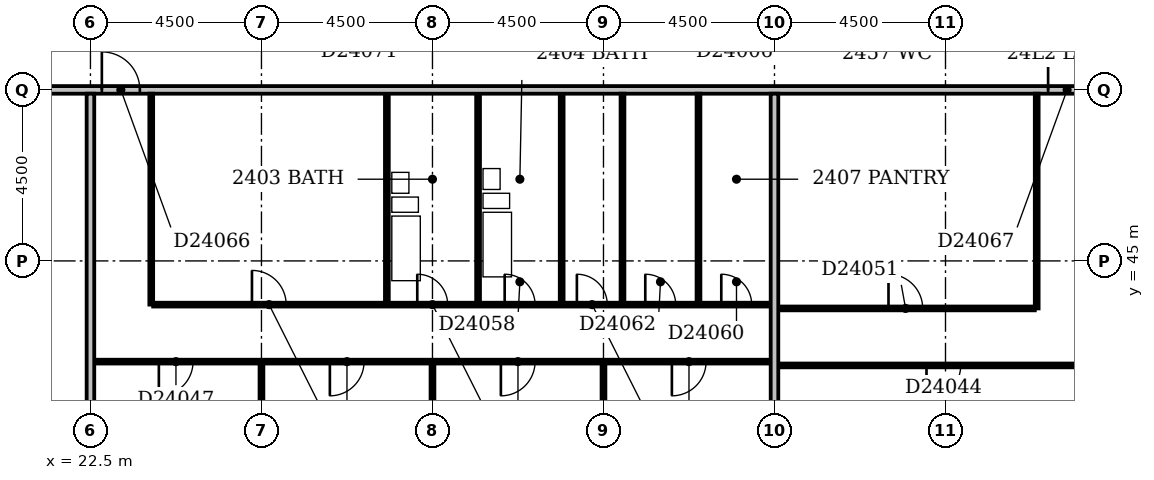
"""IFC4 building model, lengths in metres.
Left out: names, types, materials, properties, quantities, classifications, styles, units other than length and angle.
Written with IfcOpenShell. Run it as: python <this file> out.ifc"""

import sys

from ifc_helpers import new_model, si_unit, direction, frame, frame_2d, origin, place, context, subcontext, project, spatial, rectangle, extrude, element, fill, save


model = new_model("IFC4")
c1 = context("Model", 3, precision=1e-05, world=origin(), true_north=direction((0.0, 1.0)))
c2 = subcontext(c1, "Body", "Model", "MODEL_VIEW")
j1 = project(units=[si_unit("LENGTHUNIT", "METRE"), si_unit("PLANEANGLEUNIT", "RADIAN")], contexts=[c1])
p1 = place(None, origin())
s1 = spatial("IfcSite", under=j1, at=p1, CompositionType="ELEMENT")
p2 = place(p1, origin())
s2 = spatial("IfcBuilding", under=s1, at=p2, CompositionType="ELEMENT")
p3 = place(p2, frame((0.0, 0.0, 97.4)))
s3 = spatial("IfcBuildingStorey", under=s2, at=p3, CompositionType="ELEMENT", Elevation=97.4)
p4 = place(p3, frame((22.5, 36.6, 0.0), z_axis=(0.0, 0.0, 1.0), x_axis=(0.0, 1.0, 0.0)))
e1 = element("IfcWall", 1, at=p4, inside=s3, PredefinedType="PARTITIONING", context=c2, shape_type="SweptSolid", body=[
    extrude(rectangle(XDim=12.8, YDim=0.2, at=frame_2d((6.4, 0.0))), origin(), (0.0, 0.0, 1.0), 3.3),
])
p5 = place(p3, frame((27.0, 36.6, 0.0), z_axis=(0.0, 0.0, 1.0), x_axis=(0.0, 1.0, 0.0)))
e2 = element("IfcWall", 2, at=p5, inside=s3, PredefinedType="PARTITIONING", context=c2, shape_type="SweptSolid", body=[
    extrude(rectangle(XDim=5.7, YDim=0.1, at=frame_2d((2.85, 0.0))), origin(), (0.0, 0.0, 1.0), 2.6),
])
p6 = place(p3, frame((31.5, 36.6, 0.0), z_axis=(0.0, 0.0, 1.0), x_axis=(0.0, 1.0, 0.0)))
e3 = element("IfcWall", 3, at=p6, inside=s3, PredefinedType="PARTITIONING", context=c2, shape_type="SweptSolid", body=[
    extrude(rectangle(XDim=5.7, YDim=0.1, at=frame_2d((2.85, 0.0))), origin(), (0.0, 0.0, 1.0), 3.3),
])
p7 = place(p3, frame((36.0, 36.6, 0.0), z_axis=(0.0, 0.0, 1.0), x_axis=(0.0, 1.0, 0.0)))
e4 = element("IfcWall", 4, at=p7, inside=s3, PredefinedType="PARTITIONING", context=c2, shape_type="SweptSolid", body=[
    extrude(rectangle(XDim=5.7, YDim=0.1, at=frame_2d((2.85, 0.0))), origin(), (0.0, 0.0, 1.0), 2.4),
])
p8 = place(p3, frame((40.5, 36.6, 0.0), z_axis=(0.0, 0.0, 1.0), x_axis=(0.0, 1.0, 0.0)))
e5 = element("IfcWall", 5, at=p8, inside=s3, PredefinedType="PARTITIONING", context=c2, shape_type="SweptSolid", body=[
    extrude(rectangle(XDim=12.8, YDim=0.2, at=frame_2d((6.4, 0.0))), origin(), (0.0, 0.0, 1.0), 3.3),
])
p9 = place(p3, frame((40.6, 42.25, 0.0), z_axis=(0.0, 0.0, 1.0), x_axis=(1.0, 0.0, 0.0)))
e6 = element("IfcWall", 6, at=p9, inside=s3, PredefinedType="PARTITIONING", context=c2, shape_type="SweptSolid", body=[
    extrude(rectangle(XDim=17.8, YDim=0.1, at=frame_2d((8.9, 0.0))), origin(), (0.0, 0.0, 1.0), 3.3),
])
p10 = place(p9, frame((3.9, 0.0, 0.0)))
e7 = element("IfcOpeningElement", 7, at=p10, cuts=e6, PredefinedType="OPENING", context=c2, shape_type="SweptSolid", body=[
    extrude(rectangle(XDim=0.9, YDim=2.1, at=frame_2d((0.45, 1.05))), frame((0.0, 0.062, 0.0), z_axis=(0.0, -1.0, 0.0), x_axis=(1.0, 0.0, 0.0)), (0.0, 0.0, 1.0), 0.124),
])
p11 = place(p9, frame((10.7, 0.0, 0.0)))
e8 = element("IfcOpeningElement", 8, at=p11, cuts=e6, PredefinedType="OPENING", context=c2, shape_type="SweptSolid", body=[
    extrude(rectangle(XDim=0.9, YDim=2.1, at=frame_2d((0.45, 1.05))), frame((0.0, 0.062, 0.0), z_axis=(0.0, -1.0, 0.0), x_axis=(1.0, 0.0, 0.0)), (0.0, 0.0, 1.0), 0.124),
])
p12 = place(p9, frame((14.05, 0.0, 0.0)))
e9 = element("IfcOpeningElement", 9, at=p12, cuts=e6, PredefinedType="OPENING", context=c2, shape_type="SweptSolid", body=[
    extrude(rectangle(XDim=0.9, YDim=2.1, at=frame_2d((0.45, 1.05))), frame((0.0, 0.062, 0.0), z_axis=(0.0, -1.0, 0.0), x_axis=(1.0, 0.0, 0.0)), (0.0, 0.0, 1.0), 0.124),
])
p13 = place(p3, frame((22.6, 42.35, 0.0), z_axis=(0.0, 0.0, 1.0), x_axis=(1.0, 0.0, 0.0)))
e10 = element("IfcWall", 10, at=p13, inside=s3, PredefinedType="PARTITIONING", context=c2, shape_type="SweptSolid", body=[
    extrude(rectangle(XDim=17.8, YDim=0.1, at=frame_2d((8.9, 0.0))), origin(), (0.0, 0.0, 1.0), 3.3),
])
p14 = place(p13, frame((1.7, 0.0, 0.0)))
e11 = element("IfcOpeningElement", 11, at=p14, cuts=e10, PredefinedType="OPENING", context=c2, shape_type="SweptSolid", body=[
    extrude(rectangle(XDim=0.9, YDim=2.1, at=frame_2d((0.45, 1.05))), frame((0.0, 0.062, 0.0), z_axis=(0.0, -1.0, 0.0), x_axis=(1.0, 0.0, 0.0)), (0.0, 0.0, 1.0), 0.124),
])
p15 = place(p13, frame((6.2, 0.0, 0.0)))
e12 = element("IfcOpeningElement", 12, at=p15, cuts=e10, PredefinedType="OPENING", context=c2, shape_type="SweptSolid", body=[
    extrude(rectangle(XDim=0.9, YDim=2.1, at=frame_2d((0.45, 1.05))), frame((0.0, 0.062, 0.0), z_axis=(0.0, -1.0, 0.0), x_axis=(1.0, 0.0, 0.0)), (0.0, 0.0, 1.0), 0.124),
])
p16 = place(p13, frame((10.7, 0.0, 0.0)))
e13 = element("IfcOpeningElement", 13, at=p16, cuts=e10, PredefinedType="OPENING", context=c2, shape_type="SweptSolid", body=[
    extrude(rectangle(XDim=0.9, YDim=2.1, at=frame_2d((0.45, 1.05))), frame((0.0, 0.062, 0.0), z_axis=(0.0, -1.0, 0.0), x_axis=(1.0, 0.0, 0.0)), (0.0, 0.0, 1.0), 0.124),
])
p17 = place(p13, frame((15.2, 0.0, 0.0)))
e14 = element("IfcOpeningElement", 14, at=p17, cuts=e10, PredefinedType="OPENING", context=c2, shape_type="SweptSolid", body=[
    extrude(rectangle(XDim=0.9, YDim=2.1, at=frame_2d((0.45, 1.05))), frame((0.0, 0.062, 0.0), z_axis=(0.0, -1.0, 0.0), x_axis=(1.0, 0.0, 0.0)), (0.0, 0.0, 1.0), 0.124),
])
p18 = place(p3, frame((40.6, 43.75, 0.0), z_axis=(0.0, 0.0, 1.0), x_axis=(1.0, 0.0, 0.0)))
e15 = element("IfcWall", 15, at=p18, inside=s3, PredefinedType="PARTITIONING", context=c2, shape_type="SweptSolid", body=[
    extrude(rectangle(XDim=6.75, YDim=0.1, at=frame_2d((3.375, 0.0))), origin(), (0.0, 0.0, 1.0), 3.3),
])
p19 = place(p18, frame((2.9, 0.0, 0.0)))
e16 = element("IfcOpeningElement", 16, at=p19, cuts=e15, PredefinedType="OPENING", context=c2, shape_type="SweptSolid", body=[
    extrude(rectangle(XDim=0.9, YDim=2.1, at=frame_2d((0.45, 1.05))), frame((0.0, 0.062, 0.0), z_axis=(0.0, -1.0, 0.0), x_axis=(1.0, 0.0, 0.0)), (0.0, 0.0, 1.0), 0.124),
])
p20 = place(p3, frame((47.4, 43.75, 0.0), z_axis=(0.0, 0.0, 1.0), x_axis=(0.0, 1.0, 0.0)))
e17 = element("IfcWall", 17, at=p20, inside=s3, PredefinedType="PARTITIONING", context=c2, shape_type="SweptSolid", body=[
    extrude(rectangle(XDim=5.65, YDim=0.1, at=frame_2d((2.825, 0.0))), origin(), (0.0, 0.0, 1.0), 3.3),
])
p21 = place(p3, frame((24.1, 43.85, 0.0), z_axis=(0.0, 0.0, 1.0), x_axis=(0.0, 1.0, 0.0)))
e18 = element("IfcWall", 18, at=p21, inside=s3, PredefinedType="PARTITIONING", context=c2, shape_type="SweptSolid", body=[
    extrude(rectangle(XDim=5.55, YDim=0.1, at=frame_2d((2.775, 0.0))), origin(), (0.0, 0.0, 1.0), 3.3),
])
p22 = place(p3, frame((24.15, 43.85, 0.0), z_axis=(0.0, 0.0, 1.0), x_axis=(1.0, 0.0, 0.0)))
e19 = element("IfcWall", 19, at=p22, inside=s3, PredefinedType="PARTITIONING", context=c2, shape_type="SweptSolid", body=[
    extrude(rectangle(XDim=16.25, YDim=0.1, at=frame_2d((8.125, 0.0))), origin(), (0.0, 0.0, 1.0), 3.3),
])
p23 = place(p22, frame((6.95, 0.0, 0.0)))
e20 = element("IfcOpeningElement", 20, at=p23, cuts=e19, PredefinedType="OPENING", context=c2, shape_type="SweptSolid", body=[
    extrude(rectangle(XDim=0.8, YDim=2.1, at=frame_2d((0.4, 1.05))), frame((0.0, 0.062, 0.0), z_axis=(0.0, -1.0, 0.0), x_axis=(1.0, 0.0, 0.0)), (0.0, 0.0, 1.0), 0.124),
])
p24 = place(p22, frame((9.25, 0.0, 0.0)))
e21 = element("IfcOpeningElement", 21, at=p24, cuts=e19, PredefinedType="OPENING", context=c2, shape_type="SweptSolid", body=[
    extrude(rectangle(XDim=0.8, YDim=2.1, at=frame_2d((0.4, 1.05))), frame((0.0, 0.062, 0.0), z_axis=(0.0, -1.0, 0.0), x_axis=(1.0, 0.0, 0.0)), (0.0, 0.0, 1.0), 0.124),
])
p25 = place(p22, frame((2.6, 0.0, 0.0)))
e22 = element("IfcOpeningElement", 22, at=p25, cuts=e19, PredefinedType="OPENING", context=c2, shape_type="SweptSolid", body=[
    extrude(rectangle(XDim=0.9, YDim=2.1, at=frame_2d((0.45, 1.05))), frame((0.0, 0.062, 0.0), z_axis=(0.0, -1.0, 0.0), x_axis=(1.0, 0.0, 0.0)), (0.0, 0.0, 1.0), 0.124),
])
p26 = place(p22, frame((14.95, 0.0, 0.0)))
e23 = element("IfcOpeningElement", 23, at=p26, cuts=e19, PredefinedType="OPENING", context=c2, shape_type="SweptSolid", body=[
    extrude(rectangle(XDim=0.8, YDim=2.1, at=frame_2d((0.4, 1.05))), frame((0.0, 0.062, 0.0), z_axis=(0.0, -1.0, 0.0), x_axis=(1.0, 0.0, 0.0)), (0.0, 0.0, 1.0), 0.124),
])
p27 = place(p22, frame((11.15, 0.0, 0.0)))
e24 = element("IfcOpeningElement", 24, at=p27, cuts=e19, PredefinedType="OPENING", context=c2, shape_type="SweptSolid", body=[
    extrude(rectangle(XDim=0.8, YDim=2.1, at=frame_2d((0.4, 1.05))), frame((0.0, 0.062, 0.0), z_axis=(0.0, -1.0, 0.0), x_axis=(1.0, 0.0, 0.0)), (0.0, 0.0, 1.0), 0.124),
])
p28 = place(p22, frame((12.95, 0.0, 0.0)))
e25 = element("IfcOpeningElement", 25, at=p28, cuts=e19, PredefinedType="OPENING", context=c2, shape_type="SweptSolid", body=[
    extrude(rectangle(XDim=0.8, YDim=2.1, at=frame_2d((0.4, 1.05))), frame((0.0, 0.062, 0.0), z_axis=(0.0, -1.0, 0.0), x_axis=(1.0, 0.0, 0.0)), (0.0, 0.0, 1.0), 0.124),
])
for number, where, z_axis, x_axis in (
    (26, (30.3, 43.9, 0.0), (0.0, 0.0, 1.0), (0.0, 1.0, 0.0)),
    (27, (32.7, 43.9, 0.0), (0.0, 0.0, 1.0), (0.0, 1.0, 0.0)),
    (28, (34.9, 43.9, 0.0), (0.0, 0.0, 1.0), (0.0, 1.0, 0.0)),
):
    element("IfcWall", number, at=place(p3, frame(where, z_axis=z_axis, x_axis=x_axis)), inside=s3, PredefinedType="PLUMBINGWALL", context=c2, shape_type="SweptSolid", body=[
        extrude(rectangle(XDim=5.5, YDim=0.1, at=frame_2d((2.75, 0.0))), origin(), (0.0, 0.0, 1.0), 3.3),
    ])
p29 = place(p3, frame((36.5, 43.9, 0.0), z_axis=(0.0, 0.0, 1.0), x_axis=(0.0, 1.0, 0.0)))
e29 = element("IfcWall", 29, at=p29, inside=s3, PredefinedType="PARTITIONING", context=c2, shape_type="SweptSolid", body=[
    extrude(rectangle(XDim=5.5, YDim=0.1, at=frame_2d((2.75, 0.0))), origin(), (0.0, 0.0, 1.0), 2.4),
])
p30 = place(p3, frame((38.5, 43.9, 0.0), z_axis=(0.0, 0.0, 1.0), x_axis=(0.0, 1.0, 0.0)))
e30 = element("IfcWall", 30, at=p30, inside=s3, PredefinedType="PARTITIONING", context=c2, shape_type="SweptSolid", body=[
    extrude(rectangle(XDim=5.5, YDim=0.1, at=frame_2d((2.75, 0.0))), origin(), (0.0, 0.0, 1.0), 3.3),
])
p31 = place(p3, frame((9.1, 49.5, 0.0), z_axis=(0.0, 0.0, 1.0), x_axis=(1.0, 0.0, 0.0)))
e31 = element("IfcWall", 31, at=p31, inside=s3, PredefinedType="PARTITIONING", context=c2, shape_type="SweptSolid", body=[
    extrude(rectangle(XDim=57.8, YDim=0.2, at=frame_2d((28.9, 0.0))), origin(), (0.0, 0.0, 1.0), 3.3),
])
p32 = place(p31, frame((13.7, 0.0, 0.0)))
e32 = element("IfcOpeningElement", 32, at=p32, cuts=e31, PredefinedType="OPENING", context=c2, shape_type="SweptSolid", body=[
    extrude(rectangle(XDim=1.0, YDim=2.1, at=frame_2d((0.5, 1.05))), frame((0.0, 0.112, 0.0), z_axis=(0.0, -1.0, 0.0), x_axis=(1.0, 0.0, 0.0)), (0.0, 0.0, 1.0), 0.224),
])
p33 = place(p31, frame((38.6, 0.0, 0.0)))
e33 = element("IfcOpeningElement", 33, at=p33, cuts=e31, PredefinedType="OPENING", context=c2, shape_type="SweptSolid", body=[
    extrude(rectangle(XDim=1.0, YDim=2.1, at=frame_2d((0.5, 1.05))), frame((0.0, 0.112, 0.0), z_axis=(0.0, -1.0, 0.0), x_axis=(1.0, 0.0, 0.0)), (0.0, 0.0, 1.0), 0.224),
])
p34 = place(p31, frame((52.1, 0.0, 0.0)))
e34 = element("IfcOpeningElement", 34, at=p34, cuts=e31, PredefinedType="OPENING", context=c2, shape_type="SweptSolid", body=[
    extrude(rectangle(XDim=1.0, YDim=2.1, at=frame_2d((0.5, 1.05))), frame((0.0, 0.112, 0.0), z_axis=(0.0, -1.0, 0.0), x_axis=(1.0, 0.0, 0.0)), (0.0, 0.0, 1.0), 0.224),
])
p35 = place(p31, frame((6.15, 0.0, 0.0)))
e35 = element("IfcOpeningElement", 35, at=p35, cuts=e31, PredefinedType="OPENING", context=c2, shape_type="SweptSolid", body=[
    extrude(rectangle(XDim=0.9, YDim=2.1, at=frame_2d((0.45, 1.05))), frame((0.0, 0.112, 0.0), z_axis=(0.0, -1.0, 0.0), x_axis=(1.0, 0.0, 0.0)), (0.0, 0.0, 1.0), 0.224),
])
p36 = place(p31, frame((10.65, 0.0, 0.0)))
e36 = element("IfcOpeningElement", 36, at=p36, cuts=e31, PredefinedType="OPENING", context=c2, shape_type="SweptSolid", body=[
    extrude(rectangle(XDim=0.9, YDim=2.1, at=frame_2d((0.45, 1.05))), frame((0.0, 0.112, 0.0), z_axis=(0.0, -1.0, 0.0), x_axis=(1.0, 0.0, 0.0)), (0.0, 0.0, 1.0), 0.224),
])
p37 = place(p10, frame((0.9, 0.0, 0.0), z_axis=(0.0, 0.0, 1.0), x_axis=(-1.0, 0.0, 0.0)))
e37 = element("IfcDoor", 37, at=p37, inside=s3, OperationType="SINGLE_SWING_RIGHT", PredefinedType="DOOR", context=c2, shape_type="SweptSolid", body=[
    extrude(rectangle(XDim=0.9, YDim=2.1, at=frame_2d((0.45, 1.05))), frame((0.0, 0.025, 0.0), z_axis=(0.0, -1.0, 0.0), x_axis=(1.0, 0.0, 0.0)), (0.0, 0.0, 1.0), 0.05),
])
fill(e7, e37)
p38 = place(p14, frame((0.9, 0.0, 0.0), z_axis=(0.0, 0.0, 1.0), x_axis=(-1.0, 0.0, 0.0)))
e38 = element("IfcDoor", 38, at=p38, inside=s3, OperationType="SINGLE_SWING_RIGHT", PredefinedType="DOOR", context=c2, shape_type="SweptSolid", body=[
    extrude(rectangle(XDim=0.9, YDim=2.1, at=frame_2d((0.45, 1.05))), frame((0.0, 0.025, 0.0), z_axis=(0.0, -1.0, 0.0), x_axis=(1.0, 0.0, 0.0)), (0.0, 0.0, 1.0), 0.05),
])
fill(e11, e38)
p39 = place(p15, frame((0.9, 0.0, 0.0), z_axis=(0.0, 0.0, 1.0), x_axis=(-1.0, 0.0, 0.0)))
e39 = element("IfcDoor", 39, at=p39, inside=s3, OperationType="SINGLE_SWING_RIGHT", PredefinedType="DOOR", context=c2, shape_type="SweptSolid", body=[
    extrude(rectangle(XDim=0.9, YDim=2.1, at=frame_2d((0.45, 1.05))), frame((0.0, 0.025, 0.0), z_axis=(0.0, -1.0, 0.0), x_axis=(1.0, 0.0, 0.0)), (0.0, 0.0, 1.0), 0.05),
])
fill(e12, e39)
p40 = place(p16, frame((0.9, 0.0, 0.0), z_axis=(0.0, 0.0, 1.0), x_axis=(-1.0, 0.0, 0.0)))
e40 = element("IfcDoor", 40, at=p40, inside=s3, OperationType="SINGLE_SWING_RIGHT", PredefinedType="DOOR", context=c2, shape_type="SweptSolid", body=[
    extrude(rectangle(XDim=0.9, YDim=2.1, at=frame_2d((0.45, 1.05))), frame((0.0, 0.025, 0.0), z_axis=(0.0, -1.0, 0.0), x_axis=(1.0, 0.0, 0.0)), (0.0, 0.0, 1.0), 0.05),
])
fill(e13, e40)
p41 = place(p17, frame((0.9, 0.0, 0.0), z_axis=(0.0, 0.0, 1.0), x_axis=(-1.0, 0.0, 0.0)))
e41 = element("IfcDoor", 41, at=p41, inside=s3, OperationType="SINGLE_SWING_RIGHT", PredefinedType="DOOR", context=c2, shape_type="SweptSolid", body=[
    extrude(rectangle(XDim=0.9, YDim=2.1, at=frame_2d((0.45, 1.05))), frame((0.0, 0.025, 0.0), z_axis=(0.0, -1.0, 0.0), x_axis=(1.0, 0.0, 0.0)), (0.0, 0.0, 1.0), 0.05),
])
fill(e14, e41)
p42 = place(p19, origin())
e42 = element("IfcDoor", 42, at=p42, inside=s3, OperationType="SINGLE_SWING_LEFT", PredefinedType="DOOR", context=c2, shape_type="SweptSolid", body=[
    extrude(rectangle(XDim=0.9, YDim=2.1, at=frame_2d((0.45, 1.05))), frame((0.0, 0.025, 0.0), z_axis=(0.0, -1.0, 0.0), x_axis=(1.0, 0.0, 0.0)), (0.0, 0.0, 1.0), 0.05),
])
fill(e16, e42)
p43 = place(p23, origin())
e43 = element("IfcDoor", 43, at=p43, inside=s3, OperationType="SINGLE_SWING_LEFT", PredefinedType="DOOR", context=c2, shape_type="SweptSolid", body=[
    extrude(rectangle(XDim=0.8, YDim=2.1, at=frame_2d((0.4, 1.05))), frame((0.0, 0.025, 0.0), z_axis=(0.0, -1.0, 0.0), x_axis=(1.0, 0.0, 0.0)), (0.0, 0.0, 1.0), 0.05),
])
fill(e20, e43)
p44 = place(p24, origin())
e44 = element("IfcDoor", 44, at=p44, inside=s3, OperationType="SINGLE_SWING_LEFT", PredefinedType="DOOR", context=c2, shape_type="SweptSolid", body=[
    extrude(rectangle(XDim=0.8, YDim=2.1, at=frame_2d((0.4, 1.05))), frame((0.0, 0.025, 0.0), z_axis=(0.0, -1.0, 0.0), x_axis=(1.0, 0.0, 0.0)), (0.0, 0.0, 1.0), 0.05),
])
fill(e21, e44)
p45 = place(p25, origin())
e45 = element("IfcDoor", 45, at=p45, inside=s3, OperationType="SINGLE_SWING_LEFT", PredefinedType="DOOR", context=c2, shape_type="SweptSolid", body=[
    extrude(rectangle(XDim=0.9, YDim=2.1, at=frame_2d((0.45, 1.05))), frame((0.0, 0.025, 0.0), z_axis=(0.0, -1.0, 0.0), x_axis=(1.0, 0.0, 0.0)), (0.0, 0.0, 1.0), 0.05),
])
fill(e22, e45)
p46 = place(p26, origin())
e46 = element("IfcDoor", 46, at=p46, inside=s3, OperationType="SINGLE_SWING_LEFT", PredefinedType="DOOR", context=c2, shape_type="SweptSolid", body=[
    extrude(rectangle(XDim=0.8, YDim=2.1, at=frame_2d((0.4, 1.05))), frame((0.0, 0.025, 0.0), z_axis=(0.0, -1.0, 0.0), x_axis=(1.0, 0.0, 0.0)), (0.0, 0.0, 1.0), 0.05),
])
fill(e23, e46)
p47 = place(p27, origin())
e47 = element("IfcDoor", 47, at=p47, inside=s3, OperationType="SINGLE_SWING_LEFT", PredefinedType="DOOR", context=c2, shape_type="SweptSolid", body=[
    extrude(rectangle(XDim=0.8, YDim=2.1, at=frame_2d((0.4, 1.05))), frame((0.0, 0.025, 0.0), z_axis=(0.0, -1.0, 0.0), x_axis=(1.0, 0.0, 0.0)), (0.0, 0.0, 1.0), 0.05),
])
fill(e24, e47)
p48 = place(p28, origin())
e48 = element("IfcDoor", 48, at=p48, inside=s3, OperationType="SINGLE_SWING_LEFT", PredefinedType="DOOR", context=c2, shape_type="SweptSolid", body=[
    extrude(rectangle(XDim=0.8, YDim=2.1, at=frame_2d((0.4, 1.05))), frame((0.0, 0.025, 0.0), z_axis=(0.0, -1.0, 0.0), x_axis=(1.0, 0.0, 0.0)), (0.0, 0.0, 1.0), 0.05),
])
fill(e25, e48)
p49 = place(p32, origin())
e49 = element("IfcDoor", 49, at=p49, inside=s3, OperationType="SINGLE_SWING_LEFT", PredefinedType="DOOR", context=c2, shape_type="SweptSolid", body=[
    extrude(rectangle(XDim=1.0, YDim=2.1, at=frame_2d((0.5, 1.05))), frame((0.0, 0.025, 0.0), z_axis=(0.0, -1.0, 0.0), x_axis=(1.0, 0.0, 0.0)), (0.0, 0.0, 1.0), 0.05),
])
fill(e32, e49)
p50 = place(p33, origin())
e50 = element("IfcDoor", 50, at=p50, inside=s3, OperationType="SINGLE_SWING_LEFT", PredefinedType="DOOR", context=c2, shape_type="SweptSolid", body=[
    extrude(rectangle(XDim=1.0, YDim=2.1, at=frame_2d((0.5, 1.05))), frame((0.0, 0.025, 0.0), z_axis=(0.0, -1.0, 0.0), x_axis=(1.0, 0.0, 0.0)), (0.0, 0.0, 1.0), 0.05),
])
fill(e33, e50)
save(model, sys.argv[1])
